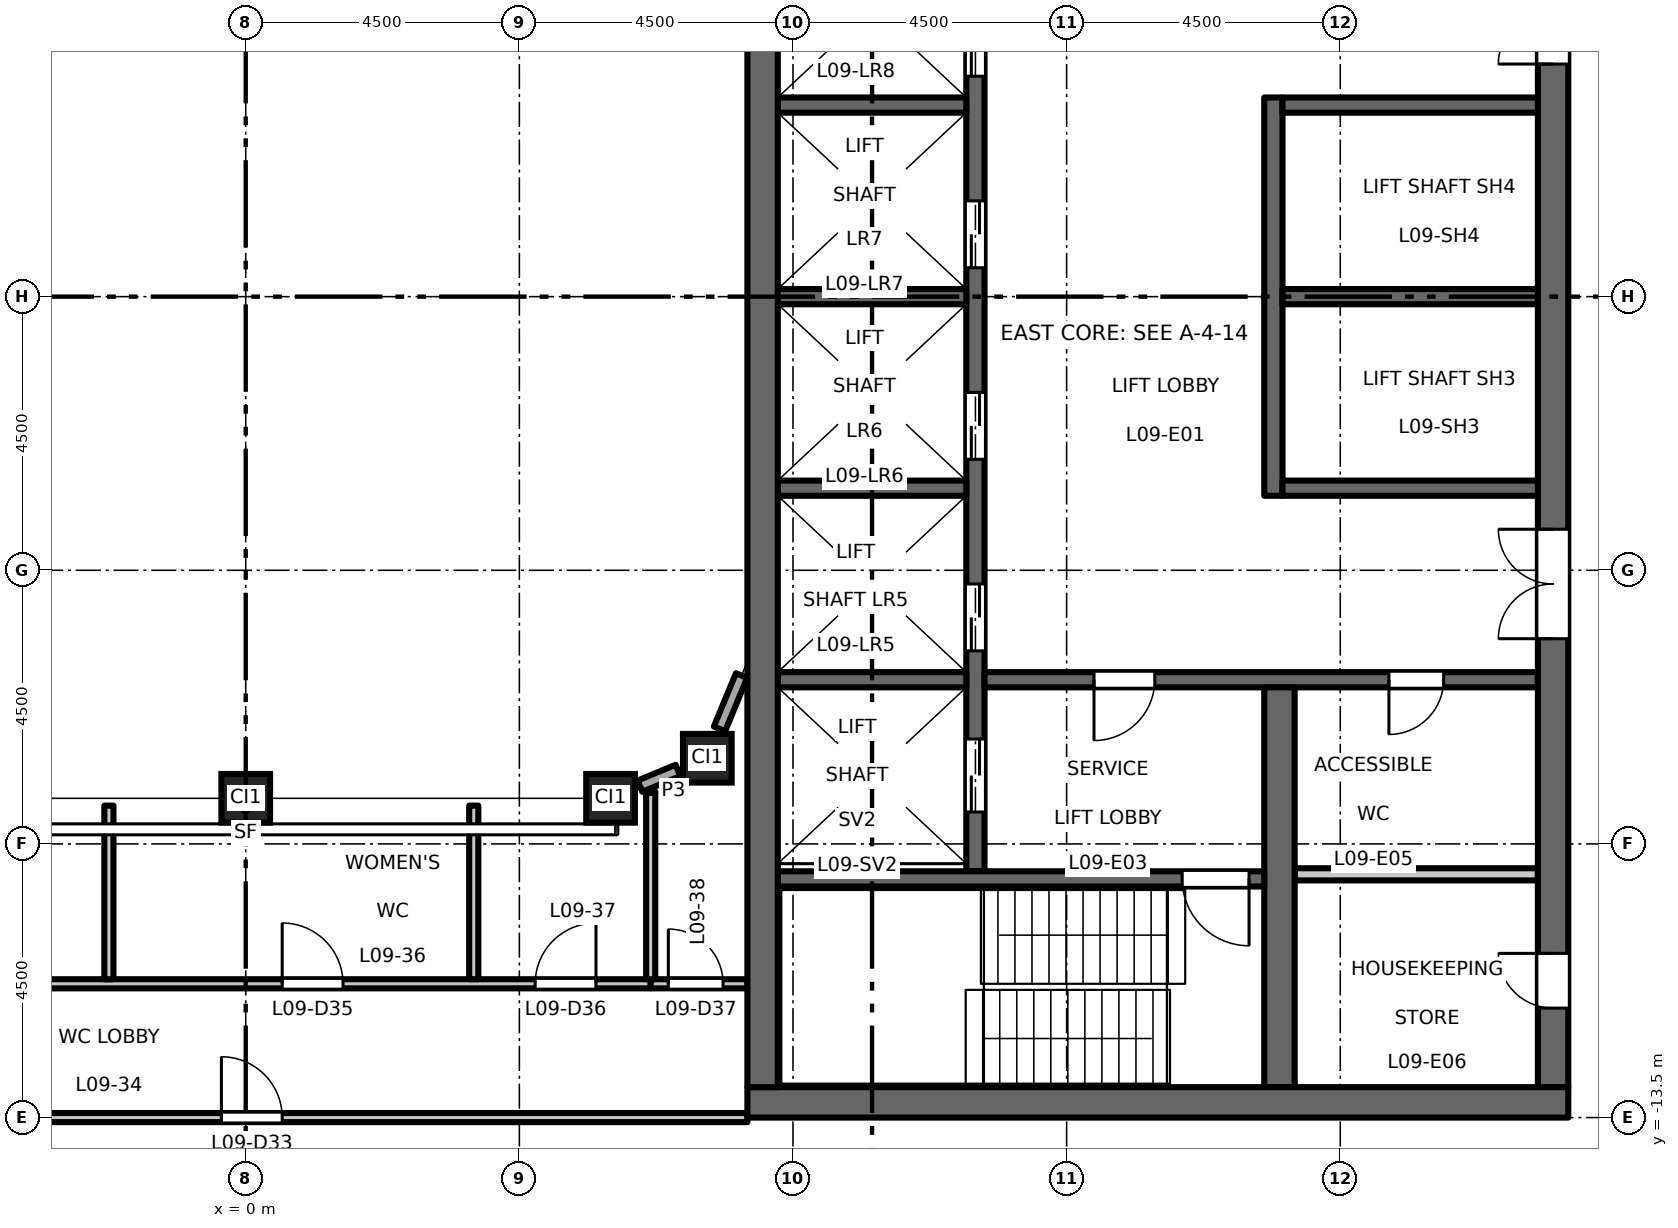
"""IFC4 building model, lengths in metres.
Left out: names, types, materials, properties, quantities, classifications, styles, units other than length and angle.
Written with IfcOpenShell. Run it as: python <this file> out.ifc"""

import sys

from ifc_helpers import new_model, si_unit, direction, frame, frame_2d, origin, origin_2d, place, context, subcontext, project, spatial, rectangle, hollow_rectangle, extrude, element, fill, save


model = new_model("IFC4")
c1 = context("Model", 3, precision=1e-05, world=origin(), true_north=direction((0.0, 1.0)))
c2 = subcontext(c1, "Body", "Model", "MODEL_VIEW")
j1 = project(units=[si_unit("LENGTHUNIT", "METRE"), si_unit("PLANEANGLEUNIT", "RADIAN")], contexts=[c1])
p1 = place(None, origin())
s1 = spatial("IfcSite", under=j1, at=p1, CompositionType="ELEMENT")
p2 = place(p1, origin())
s2 = spatial("IfcBuilding", under=s1, at=p2, CompositionType="ELEMENT")
p3 = place(p2, frame((0.0, 0.0, 44.7)))
s3 = spatial("IfcBuildingStorey", under=s2, at=p3, CompositionType="ELEMENT", Elevation=44.7)
for number, where, z_axis, x_axis in (
    (1, (0.0, -8.25, 0.0), (0.0, 0.0, 1.0), (1.0, 0.0, 0.0)),
    (2, (6.0, -8.25, 0.0), (0.0, 0.0, 1.0), (1.0, 0.0, 0.0)),
    (3, (7.591, -7.591, 0.0), (0.0, 0.0, 1.0), (1.0, 0.0, 0.0)),
):
    element("IfcColumn", number, at=place(p3, frame(where, z_axis=z_axis, x_axis=x_axis)), inside=s3, PredefinedType="COLUMN", context=c2, shape_type="SweptSolid", body=[
        extrude(hollow_rectangle(XDim=0.8, YDim=0.8, WallThickness=0.05, at=origin_2d()), origin(), (0.0, 0.0, 1.0), 4.5),
    ])
p4 = place(p3, frame((12.0, -9.45, 0.0), z_axis=(0.0, 0.0, 1.0), x_axis=(0.0, 1.0, 0.0)))
e4 = element("IfcWall", 4, at=p4, inside=s3, PredefinedType="SHEAR", context=c2, shape_type="SweptSolid", body=[
    extrude(rectangle(XDim=18.9, YDim=0.3, at=frame_2d((9.45, 0.0))), origin(), (0.0, 0.0, 1.0), 4.35),
])
p5 = place(p4, frame((3.625, 0.0, 0.0)))
e5 = element("IfcOpeningElement", 5, at=p5, cuts=e4, PredefinedType="OPENING", context=c2, shape_type="SweptSolid", body=[
    extrude(rectangle(XDim=1.1, YDim=2.1, at=frame_2d((0.55, 1.05))), frame((0.0, 0.16, 0.0), z_axis=(0.0, -1.0, 0.0), x_axis=(1.0, 0.0, 0.0)), (0.0, 0.0, 1.0), 0.32),
])
p6 = place(p4, frame((6.775, 0.0, 0.0)))
e6 = element("IfcOpeningElement", 6, at=p6, cuts=e4, PredefinedType="OPENING", context=c2, shape_type="SweptSolid", body=[
    extrude(rectangle(XDim=1.1, YDim=2.1, at=frame_2d((0.55, 1.05))), frame((0.0, 0.16, 0.0), z_axis=(0.0, -1.0, 0.0), x_axis=(1.0, 0.0, 0.0)), (0.0, 0.0, 1.0), 0.32),
])
p7 = place(p4, frame((9.925, 0.0, 0.0)))
e7 = element("IfcOpeningElement", 7, at=p7, cuts=e4, PredefinedType="OPENING", context=c2, shape_type="SweptSolid", body=[
    extrude(rectangle(XDim=1.1, YDim=2.1, at=frame_2d((0.55, 1.05))), frame((0.0, 0.16, 0.0), z_axis=(0.0, -1.0, 0.0), x_axis=(1.0, 0.0, 0.0)), (0.0, 0.0, 1.0), 0.32),
])
p8 = place(p4, frame((13.075, 0.0, 0.0)))
e8 = element("IfcOpeningElement", 8, at=p8, cuts=e4, PredefinedType="OPENING", context=c2, shape_type="SweptSolid", body=[
    extrude(rectangle(XDim=1.1, YDim=2.1, at=frame_2d((0.55, 1.05))), frame((0.0, 0.16, 0.0), z_axis=(0.0, -1.0, 0.0), x_axis=(1.0, 0.0, 0.0)), (0.0, 0.0, 1.0), 0.32),
])
p9 = place(p4, frame((16.725, 0.0, 0.0)))
e9 = element("IfcOpeningElement", 9, at=p9, cuts=e4, PredefinedType="OPENING", context=c2, shape_type="SweptSolid", body=[
    extrude(rectangle(XDim=1.2, YDim=2.1, at=frame_2d((0.6, 1.05))), frame((0.0, 0.16, 0.0), z_axis=(0.0, -1.0, 0.0), x_axis=(1.0, 0.0, 0.0)), (0.0, 0.0, 1.0), 0.32),
])
p10 = place(p4, frame((0.975, 0.0, 0.0)))
e10 = element("IfcOpeningElement", 10, at=p10, cuts=e4, PredefinedType="OPENING", context=c2, shape_type="SweptSolid", body=[
    extrude(rectangle(XDim=1.2, YDim=2.1, at=frame_2d((0.6, 1.05))), frame((0.0, 0.16, 0.0), z_axis=(0.0, -1.0, 0.0), x_axis=(1.0, 0.0, 0.0)), (0.0, 0.0, 1.0), 0.32),
])
p11 = place(p3, frame((12.15, -6.3, 0.0), z_axis=(0.0, 0.0, 1.0), x_axis=(1.0, 0.0, 0.0)))
e11 = element("IfcWall", 11, at=p11, inside=s3, PredefinedType="SHEAR", context=c2, shape_type="SweptSolid", body=[
    extrude(rectangle(XDim=9.1, YDim=0.25, at=frame_2d((4.55, 0.0))), origin(), (0.0, 0.0, 1.0), 4.35),
])
p12 = place(p11, frame((1.8, 0.0, 0.0)))
e12 = element("IfcOpeningElement", 12, at=p12, cuts=e11, PredefinedType="OPENING", context=c2, shape_type="SweptSolid", body=[
    extrude(rectangle(XDim=1.0, YDim=2.1, at=frame_2d((0.5, 1.05))), frame((0.0, 0.135, 0.0), z_axis=(0.0, -1.0, 0.0), x_axis=(1.0, 0.0, 0.0)), (0.0, 0.0, 1.0), 0.27),
])
p13 = place(p11, frame((6.65, 0.0, 0.0)))
e13 = element("IfcOpeningElement", 13, at=p13, cuts=e11, PredefinedType="OPENING", context=c2, shape_type="SweptSolid", body=[
    extrude(rectangle(XDim=0.9, YDim=2.1, at=frame_2d((0.45, 1.05))), frame((0.0, 0.135, 0.0), z_axis=(0.0, -1.0, 0.0), x_axis=(1.0, 0.0, 0.0)), (0.0, 0.0, 1.0), 0.27),
])
p14 = place(p3, frame((21.5, -13.0, 0.0), z_axis=(0.0, 0.0, 1.0), x_axis=(0.0, 1.0, 0.0)))
e14 = element("IfcWall", 14, at=p14, inside=s3, PredefinedType="SHEAR", context=c2, shape_type="SweptSolid", body=[
    extrude(rectangle(XDim=26.0, YDim=0.5, at=frame_2d((13.0, 0.0))), origin(), (0.0, 0.0, 1.0), 4.35),
])
p15 = place(p14, frame((16.825, 0.0, 0.0)))
e15 = element("IfcOpeningElement", 15, at=p15, cuts=e14, PredefinedType="OPENING", context=c2, shape_type="SweptSolid", body=[
    extrude(rectangle(XDim=1.8, YDim=2.1, at=frame_2d((0.9, 1.05))), frame((0.0, 0.26, 0.0), z_axis=(0.0, -1.0, 0.0), x_axis=(1.0, 0.0, 0.0)), (0.0, 0.0, 1.0), 0.52),
])
p16 = place(p14, frame((7.375, 0.0, 0.0)))
e16 = element("IfcOpeningElement", 16, at=p16, cuts=e14, PredefinedType="OPENING", context=c2, shape_type="SweptSolid", body=[
    extrude(rectangle(XDim=1.8, YDim=2.1, at=frame_2d((0.9, 1.05))), frame((0.0, 0.26, 0.0), z_axis=(0.0, -1.0, 0.0), x_axis=(1.0, 0.0, 0.0)), (0.0, 0.0, 1.0), 0.52),
])
p17 = place(p14, frame((1.3, 0.0, 0.0)))
e17 = element("IfcOpeningElement", 17, at=p17, cuts=e14, PredefinedType="OPENING", context=c2, shape_type="SweptSolid", body=[
    extrude(rectangle(XDim=0.9, YDim=2.1, at=frame_2d((0.45, 1.05))), frame((0.0, 0.26, 0.0), z_axis=(0.0, -1.0, 0.0), x_axis=(1.0, 0.0, 0.0)), (0.0, 0.0, 1.0), 0.52),
])
p18 = place(p3, frame((17.25, -9.5, 0.0), z_axis=(0.0, 0.0, 1.0), x_axis=(1.0, 0.0, 0.0)))
e18 = element("IfcWall", 18, at=p18, inside=s3, PredefinedType="PARTITIONING", context=c2, shape_type="SweptSolid", body=[
    extrude(rectangle(XDim=4.0, YDim=0.2, at=frame_2d((2.0, 0.0))), origin(), (0.0, 0.0, 1.0), 4.35),
])
p19 = place(p3, frame((16.9, -3.275, 0.0), z_axis=(0.0, 0.0, 1.0), x_axis=(0.0, 1.0, 0.0)))
e19 = element("IfcWall", 19, at=p19, inside=s3, PredefinedType="SHEAR", context=c2, shape_type="SweptSolid", body=[
    extrude(rectangle(XDim=6.55, YDim=0.3, at=frame_2d((3.275, 0.0))), origin(), (0.0, 0.0, 1.0), 4.35),
])
for number, where, z_axis, x_axis in (
    (20, (17.05, 0.0, 0.0), (0.0, 0.0, 1.0), (1.0, 0.0, 0.0)),
    (21, (17.05, 3.15, 0.0), (0.0, 0.0, 1.0), (1.0, 0.0, 0.0)),
    (22, (17.05, -3.15, 0.0), (0.0, 0.0, 1.0), (1.0, 0.0, 0.0)),
):
    element("IfcWall", number, at=place(p3, frame(where, z_axis=z_axis, x_axis=x_axis)), inside=s3, PredefinedType="SHEAR", context=c2, shape_type="SweptSolid", body=[
        extrude(rectangle(XDim=4.2, YDim=0.25, at=frame_2d((2.1, 0.0))), origin(), (0.0, 0.0, 1.0), 4.35),
    ])
p20 = place(p3, frame((17.0, -13.0, 0.0), z_axis=(0.0, 0.0, 1.0), x_axis=(0.0, 1.0, 0.0)))
e23 = element("IfcWall", 23, at=p20, inside=s3, PredefinedType="SHEAR", context=c2, shape_type="SweptSolid", body=[
    extrude(rectangle(XDim=6.575, YDim=0.5, at=frame_2d((3.288, 0.0))), origin(), (0.0, 0.0, 1.0), 4.35),
])
for number, where, z_axis, x_axis in (
    (24, (8.75, 0.0, 0.0), (0.0, 0.0, 1.0), (1.0, 0.0, 0.0)),
    (25, (8.75, 3.15, 0.0), (0.0, 0.0, 1.0), (1.0, 0.0, 0.0)),
    (26, (8.75, -3.15, 0.0), (0.0, 0.0, 1.0), (1.0, 0.0, 0.0)),
    (27, (8.75, -6.3, 0.0), (0.0, 0.0, 1.0), (1.0, 0.0, 0.0)),
):
    element("IfcWall", number, at=place(p3, frame(where, z_axis=z_axis, x_axis=x_axis)), inside=s3, PredefinedType="SHEAR", context=c2, shape_type="SweptSolid", body=[
        extrude(rectangle(XDim=3.1, YDim=0.25, at=frame_2d((1.55, 0.0))), origin(), (0.0, 0.0, 1.0), 4.35),
    ])
p21 = place(p3, frame((8.75, -9.575, 0.0), z_axis=(0.0, 0.0, 1.0), x_axis=(1.0, 0.0, 0.0)))
e28 = element("IfcWall", 28, at=p21, inside=s3, PredefinedType="SHEAR", context=c2, shape_type="SweptSolid", body=[
    extrude(rectangle(XDim=8.0, YDim=0.25, at=frame_2d((4.0, 0.0))), origin(), (0.0, 0.0, 1.0), 4.35),
])
p22 = place(p21, frame((6.65, 0.0, 0.0)))
e29 = element("IfcOpeningElement", 29, at=p22, cuts=e28, PredefinedType="OPENING", context=c2, shape_type="SweptSolid", body=[
    extrude(rectangle(XDim=1.1, YDim=2.1, at=frame_2d((0.55, 1.05))), frame((0.0, 0.135, 0.0), z_axis=(0.0, -1.0, 0.0), x_axis=(1.0, 0.0, 0.0)), (0.0, 0.0, 1.0), 0.27),
])
p23 = place(p3, frame((8.25, -13.25, 0.0), z_axis=(0.0, 0.0, 1.0), x_axis=(1.0, 0.0, 0.0)))
e30 = element("IfcWall", 30, at=p23, inside=s3, PredefinedType="SHEAR", context=c2, shape_type="SweptSolid", body=[
    extrude(rectangle(XDim=13.5, YDim=0.5, at=frame_2d((6.75, 0.0))), origin(), (0.0, 0.0, 1.0), 4.35),
])
p24 = place(p3, frame((8.5, -13.0, 0.0), z_axis=(0.0, 0.0, 1.0), x_axis=(0.0, 1.0, 0.0)))
e31 = element("IfcWall", 31, at=p24, inside=s3, PredefinedType="SHEAR", context=c2, shape_type="SweptSolid", body=[
    extrude(rectangle(XDim=26.0, YDim=0.5, at=frame_2d((13.0, 0.0))), origin(), (0.0, 0.0, 1.0), 4.35),
])
p25 = place(p3, frame((6.483, -8.05, 0.0), z_axis=(0.0, 0.0, 1.0), x_axis=(0.923854141361, 0.382744726273, 0.0)))
e32 = element("IfcWall", 32, at=p25, inside=s3, PredefinedType="STANDARD", context=c2, shape_type="SweptSolid", body=[
    extrude(rectangle(XDim=0.677, YDim=0.2, at=frame_2d((0.338, 0.0))), origin(), (0.0, 0.0, 1.0), 3.73),
])
p26 = place(p3, frame((7.791, -7.108, 0.0), z_axis=(0.0, 0.0, 1.0), x_axis=(0.382624318388, 0.923904016107, 0.0)))
e33 = element("IfcWall", 33, at=p26, inside=s3, PredefinedType="STANDARD", context=c2, shape_type="SweptSolid", body=[
    extrude(rectangle(XDim=0.949, YDim=0.2, at=frame_2d((0.475, 0.0))), origin(), (0.0, 0.0, 1.0), 3.73),
])
p27 = place(p3, frame((-8.25, -13.5, 0.0), z_axis=(0.0, 0.0, 1.0), x_axis=(1.0, 0.0, 0.0)))
e34 = element("IfcWall", 34, at=p27, inside=s3, PredefinedType="PARTITIONING", context=c2, shape_type="SweptSolid", body=[
    extrude(rectangle(XDim=16.5, YDim=0.15, at=frame_2d((8.25, 0.0))), origin(), (0.0, 0.0, 1.0), 3.85),
])
p28 = place(p27, frame((7.85, 0.0, 0.0)))
e35 = element("IfcOpeningElement", 35, at=p28, cuts=e34, PredefinedType="OPENING", context=c2, shape_type="SweptSolid", body=[
    extrude(rectangle(XDim=1.0, YDim=2.1, at=frame_2d((0.5, 1.05))), frame((0.0, 0.085, 0.0), z_axis=(0.0, -1.0, 0.0), x_axis=(1.0, 0.0, 0.0)), (0.0, 0.0, 1.0), 0.17),
])
p29 = place(p3, frame((-8.25, -11.3, 0.0), z_axis=(0.0, 0.0, 1.0), x_axis=(1.0, 0.0, 0.0)))
e36 = element("IfcWall", 36, at=p29, inside=s3, PredefinedType="PARTITIONING", context=c2, shape_type="SweptSolid", body=[
    extrude(rectangle(XDim=14.91, YDim=0.15, at=frame_2d((7.455, 0.0))), origin(), (0.0, 0.0, 1.0), 4.35),
])
p30 = place(p29, frame((2.6, 0.0, 0.0)))
e37 = element("IfcOpeningElement", 37, at=p30, cuts=e36, PredefinedType="OPENING", context=c2, shape_type="SweptSolid", body=[
    extrude(rectangle(XDim=1.0, YDim=2.1, at=frame_2d((0.5, 1.05))), frame((0.0, 0.085, 0.0), z_axis=(0.0, -1.0, 0.0), x_axis=(1.0, 0.0, 0.0)), (0.0, 0.0, 1.0), 0.17),
])
p31 = place(p29, frame((8.85, 0.0, 0.0)))
e38 = element("IfcOpeningElement", 38, at=p31, cuts=e36, PredefinedType="OPENING", context=c2, shape_type="SweptSolid", body=[
    extrude(rectangle(XDim=1.0, YDim=2.1, at=frame_2d((0.5, 1.05))), frame((0.0, 0.085, 0.0), z_axis=(0.0, -1.0, 0.0), x_axis=(1.0, 0.0, 0.0)), (0.0, 0.0, 1.0), 0.17),
])
p32 = place(p29, frame((13.01, 0.0, 0.0)))
e39 = element("IfcOpeningElement", 39, at=p32, cuts=e36, PredefinedType="OPENING", context=c2, shape_type="SweptSolid", body=[
    extrude(rectangle(XDim=1.0, YDim=2.1, at=frame_2d((0.5, 1.05))), frame((0.0, 0.085, 0.0), z_axis=(0.0, -1.0, 0.0), x_axis=(1.0, 0.0, 0.0)), (0.0, 0.0, 1.0), 0.17),
])
p33 = place(p3, frame((6.66, -11.3, 0.0), z_axis=(0.0, 0.0, 1.0), x_axis=(1.0, 0.0, 0.0)))
e40 = element("IfcWall", 40, at=p33, inside=s3, PredefinedType="PARTITIONING", context=c2, shape_type="SweptSolid", body=[
    extrude(rectangle(XDim=1.59, YDim=0.15, at=frame_2d((0.795, 0.0))), origin(), (0.0, 0.0, 1.0), 4.35),
])
p34 = place(p33, frame((0.29, 0.0, 0.0)))
e41 = element("IfcOpeningElement", 41, at=p34, cuts=e40, PredefinedType="OPENING", context=c2, shape_type="SweptSolid", body=[
    extrude(rectangle(XDim=0.9, YDim=2.1, at=frame_2d((0.45, 1.05))), frame((0.0, 0.085, 0.0), z_axis=(0.0, -1.0, 0.0), x_axis=(1.0, 0.0, 0.0)), (0.0, 0.0, 1.0), 0.17),
])
for number, where, z_axis, x_axis in (
    (42, (-2.25, -11.225, 0.0), (0.0, 0.0, 1.0), (0.0, 1.0, 0.0)),
    (43, (3.75, -11.225, 0.0), (0.0, 0.0, 1.0), (0.0, 1.0, 0.0)),
):
    element("IfcWall", number, at=place(p3, frame(where, z_axis=z_axis, x_axis=x_axis)), inside=s3, PredefinedType="PARTITIONING", context=c2, shape_type="SweptSolid", body=[
        extrude(rectangle(XDim=2.855, YDim=0.15, at=frame_2d((1.427, 0.0))), origin(), (0.0, 0.0, 1.0), 4.35),
    ])
p35 = place(p3, frame((6.66, -11.225, 0.0), z_axis=(0.0, 0.0, 1.0), x_axis=(0.0, 1.0, 0.0)))
e44 = element("IfcWall", 44, at=p35, inside=s3, PredefinedType="PARTITIONING", context=c2, shape_type="SweptSolid", body=[
    extrude(rectangle(XDim=3.089, YDim=0.15, at=frame_2d((1.544, 0.0))), origin(), (0.0, 0.0, 1.0), 4.35),
])
p36 = place(p12, origin())
e45 = element("IfcDoor", 45, at=p36, inside=s3, OperationType="SINGLE_SWING_LEFT", PredefinedType="DOOR", context=c2, shape_type="SweptSolid", body=[
    extrude(rectangle(XDim=1.0, YDim=2.1, at=frame_2d((0.5, 1.05))), frame((0.0, 0.025, 0.0), z_axis=(0.0, -1.0, 0.0), x_axis=(1.0, 0.0, 0.0)), (0.0, 0.0, 1.0), 0.05),
])
fill(e12, e45)
p37 = place(p22, origin())
e46 = element("IfcDoor", 46, at=p37, inside=s3, OperationType="SINGLE_SWING_RIGHT", PredefinedType="DOOR", context=c2, shape_type="SweptSolid", body=[
    extrude(rectangle(XDim=1.1, YDim=2.1, at=frame_2d((0.55, 1.05))), frame((0.0, 0.025, 0.0), z_axis=(0.0, -1.0, 0.0), x_axis=(1.0, 0.0, 0.0)), (0.0, 0.0, 1.0), 0.05),
])
fill(e29, e46)
p38 = place(p15, origin())
e47 = element("IfcDoor", 47, at=p38, inside=s3, OperationType="DOUBLE_DOOR_DOUBLE_SWING", PredefinedType="DOOR", context=c2, shape_type="SweptSolid", body=[
    extrude(rectangle(XDim=1.8, YDim=2.1, at=frame_2d((0.9, 1.05))), frame((0.0, 0.025, 0.0), z_axis=(0.0, -1.0, 0.0), x_axis=(1.0, 0.0, 0.0)), (0.0, 0.0, 1.0), 0.05),
])
fill(e15, e47)
p39 = place(p16, origin())
e48 = element("IfcDoor", 48, at=p39, inside=s3, OperationType="DOUBLE_DOOR_DOUBLE_SWING", PredefinedType="DOOR", context=c2, shape_type="SweptSolid", body=[
    extrude(rectangle(XDim=1.8, YDim=2.1, at=frame_2d((0.9, 1.05))), frame((0.0, 0.025, 0.0), z_axis=(0.0, -1.0, 0.0), x_axis=(1.0, 0.0, 0.0)), (0.0, 0.0, 1.0), 0.05),
])
fill(e16, e48)
p40 = place(p5, origin())
e49 = element("IfcDoor", 49, at=p40, inside=s3, OperationType="DOUBLE_DOOR_SLIDING", PredefinedType="DOOR", context=c2, shape_type="SweptSolid", body=[
    extrude(rectangle(XDim=1.1, YDim=2.1, at=frame_2d((0.55, 1.05))), frame((0.0, 0.025, 0.0), z_axis=(0.0, -1.0, 0.0), x_axis=(1.0, 0.0, 0.0)), (0.0, 0.0, 1.0), 0.05),
])
fill(e5, e49)
p41 = place(p6, origin())
e50 = element("IfcDoor", 50, at=p41, inside=s3, OperationType="DOUBLE_DOOR_SLIDING", PredefinedType="DOOR", context=c2, shape_type="SweptSolid", body=[
    extrude(rectangle(XDim=1.1, YDim=2.1, at=frame_2d((0.55, 1.05))), frame((0.0, 0.025, 0.0), z_axis=(0.0, -1.0, 0.0), x_axis=(1.0, 0.0, 0.0)), (0.0, 0.0, 1.0), 0.05),
])
fill(e6, e50)
p42 = place(p7, origin())
e51 = element("IfcDoor", 51, at=p42, inside=s3, OperationType="DOUBLE_DOOR_SLIDING", PredefinedType="DOOR", context=c2, shape_type="SweptSolid", body=[
    extrude(rectangle(XDim=1.1, YDim=2.1, at=frame_2d((0.55, 1.05))), frame((0.0, 0.025, 0.0), z_axis=(0.0, -1.0, 0.0), x_axis=(1.0, 0.0, 0.0)), (0.0, 0.0, 1.0), 0.05),
])
fill(e7, e51)
p43 = place(p8, origin())
e52 = element("IfcDoor", 52, at=p43, inside=s3, OperationType="DOUBLE_DOOR_SLIDING", PredefinedType="DOOR", context=c2, shape_type="SweptSolid", body=[
    extrude(rectangle(XDim=1.1, YDim=2.1, at=frame_2d((0.55, 1.05))), frame((0.0, 0.025, 0.0), z_axis=(0.0, -1.0, 0.0), x_axis=(1.0, 0.0, 0.0)), (0.0, 0.0, 1.0), 0.05),
])
fill(e8, e52)
p44 = place(p10, origin())
e53 = element("IfcDoor", 53, at=p44, inside=s3, OperationType="DOUBLE_DOOR_SLIDING", PredefinedType="DOOR", context=c2, shape_type="SweptSolid", body=[
    extrude(rectangle(XDim=1.2, YDim=2.1, at=frame_2d((0.6, 1.05))), frame((0.0, 0.025, 0.0), z_axis=(0.0, -1.0, 0.0), x_axis=(1.0, 0.0, 0.0)), (0.0, 0.0, 1.0), 0.05),
])
fill(e10, e53)
p45 = place(p13, origin())
e54 = element("IfcDoor", 54, at=p45, inside=s3, OperationType="SINGLE_SWING_LEFT", PredefinedType="DOOR", context=c2, shape_type="SweptSolid", body=[
    extrude(rectangle(XDim=0.9, YDim=2.1, at=frame_2d((0.45, 1.05))), frame((0.0, 0.025, 0.0), z_axis=(0.0, -1.0, 0.0), x_axis=(1.0, 0.0, 0.0)), (0.0, 0.0, 1.0), 0.05),
])
fill(e13, e54)
p46 = place(p17, origin())
e55 = element("IfcDoor", 55, at=p46, inside=s3, OperationType="SINGLE_SWING_LEFT", PredefinedType="DOOR", context=c2, shape_type="SweptSolid", body=[
    extrude(rectangle(XDim=0.9, YDim=2.1, at=frame_2d((0.45, 1.05))), frame((0.0, 0.025, 0.0), z_axis=(0.0, -1.0, 0.0), x_axis=(1.0, 0.0, 0.0)), (0.0, 0.0, 1.0), 0.05),
])
fill(e17, e55)
p47 = place(p28, origin())
e56 = element("IfcDoor", 56, at=p47, inside=s3, OperationType="SINGLE_SWING_LEFT", PredefinedType="DOOR", context=c2, shape_type="SweptSolid", body=[
    extrude(rectangle(XDim=1.0, YDim=2.1, at=frame_2d((0.5, 1.05))), frame((0.0, 0.025, 0.0), z_axis=(0.0, -1.0, 0.0), x_axis=(1.0, 0.0, 0.0)), (0.0, 0.0, 1.0), 0.05),
])
fill(e35, e56)
p48 = place(p31, origin())
e57 = element("IfcDoor", 57, at=p48, inside=s3, OperationType="SINGLE_SWING_LEFT", PredefinedType="DOOR", context=c2, shape_type="SweptSolid", body=[
    extrude(rectangle(XDim=1.0, YDim=2.1, at=frame_2d((0.5, 1.05))), frame((0.0, 0.025, 0.0), z_axis=(0.0, -1.0, 0.0), x_axis=(1.0, 0.0, 0.0)), (0.0, 0.0, 1.0), 0.05),
])
fill(e38, e57)
p49 = place(p32, origin())
e58 = element("IfcDoor", 58, at=p49, inside=s3, OperationType="SINGLE_SWING_RIGHT", PredefinedType="DOOR", context=c2, shape_type="SweptSolid", body=[
    extrude(rectangle(XDim=1.0, YDim=2.1, at=frame_2d((0.5, 1.05))), frame((0.0, 0.025, 0.0), z_axis=(0.0, -1.0, 0.0), x_axis=(1.0, 0.0, 0.0)), (0.0, 0.0, 1.0), 0.05),
])
fill(e39, e58)
p50 = place(p34, origin())
e59 = element("IfcDoor", 59, at=p50, inside=s3, OperationType="SINGLE_SWING_LEFT", PredefinedType="DOOR", context=c2, shape_type="SweptSolid", body=[
    extrude(rectangle(XDim=0.9, YDim=2.1, at=frame_2d((0.45, 1.05))), frame((0.0, 0.025, 0.0), z_axis=(0.0, -1.0, 0.0), x_axis=(1.0, 0.0, 0.0)), (0.0, 0.0, 1.0), 0.05),
])
fill(e41, e59)
save(model, sys.argv[1])
